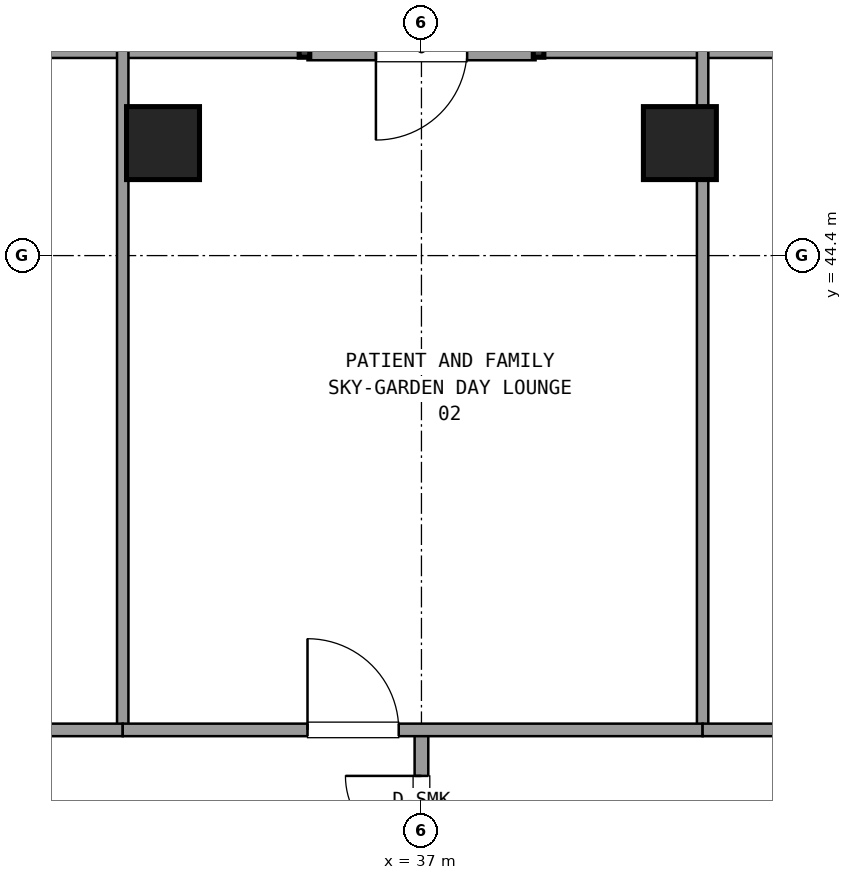
"""IFC4 building model, lengths in metres.
Left out: names, types, materials, properties, quantities, classifications, styles, units other than length and angle.
Written with IfcOpenShell. Run it as: python <this file> out.ifc"""

import sys

from ifc_helpers import new_model, si_unit, direction, frame, frame_2d, origin, origin_2d, place, context, subcontext, project, spatial, rectangle, extrude, element, fill, save


model = new_model("IFC4")
c1 = context("Model", 3, precision=1e-05, world=origin(), true_north=direction((0.0, 1.0)))
c2 = subcontext(c1, "Body", "Model", "MODEL_VIEW")
j1 = project(units=[si_unit("LENGTHUNIT", "METRE"), si_unit("PLANEANGLEUNIT", "RADIAN")], contexts=[c1])
p1 = place(None, origin())
s1 = spatial("IfcSite", under=j1, at=p1, CompositionType="ELEMENT")
p2 = place(p1, origin())
s2 = spatial("IfcBuilding", under=s1, at=p2, CompositionType="ELEMENT")
p3 = place(p2, frame((0.0, 0.0, 160.02)))
s3 = spatial("IfcBuildingStorey", under=s2, at=p3, CompositionType="ELEMENT", Elevation=160.02)
for number, where, z_axis, x_axis in (
    (1, (40.4, 45.88, 0.0), (0.0, 0.0, 1.0), (1.0, 0.0, 0.0)),
    (2, (33.6, 45.88, 0.0), (0.0, 0.0, 1.0), (1.0, 0.0, 0.0)),
):
    element("IfcColumn", number, at=place(p3, frame(where, z_axis=z_axis, x_axis=x_axis)), inside=s3, PredefinedType="COLUMN", context=c2, shape_type="SweptSolid", body=[
        extrude(rectangle(XDim=0.96, YDim=0.96, at=origin_2d()), origin(), (0.0, 0.0, 1.0), 3.6),
    ])
p4 = place(p3, frame((38.501, 47.12, 0.0), z_axis=(0.0, 0.0, 1.0), x_axis=(-1.0, 0.0, 0.0)))
e3 = element("IfcWall", 3, at=p4, inside=s3, PredefinedType="SOLIDWALL", context=c2, shape_type="SweptSolid", body=[
    extrude(rectangle(XDim=3.0, YDim=0.3, at=frame_2d((1.5, 0.0))), origin(), (0.0, 0.0, 1.0), 2.67),
])
p5 = place(p4, frame((0.9, 0.0, 0.0)))
e4 = element("IfcOpeningElement", 4, at=p5, cuts=e3, PredefinedType="OPENING", context=c2, shape_type="SweptSolid", body=[
    extrude(rectangle(XDim=1.2, YDim=2.2, at=frame_2d((0.6, 1.1))), frame((0.0, 0.16, 0.0), z_axis=(0.0, -1.0, 0.0), x_axis=(1.0, 0.0, 0.0)), (0.0, 0.0, 1.0), 0.32),
])
p6 = place(p3, frame((54.329, 47.12, 0.0), z_axis=(0.0, 0.0, 1.0), x_axis=(-1.0, 0.0, 0.0)))
e5 = element("IfcWall", 5, at=p6, inside=s3, PredefinedType="SOLIDWALL", context=c2, shape_type="SweptSolid", body=[
    extrude(rectangle(XDim=15.788, YDim=0.24, at=frame_2d((7.894, 0.0))), origin(), (0.0, 0.0, 1.0), 0.85),
])
p7 = place(p3, frame((35.461, 47.12, 0.0), z_axis=(0.0, 0.0, 1.0), x_axis=(-1.0, 0.0, 0.0)))
e6 = element("IfcWall", 6, at=p7, inside=s3, PredefinedType="SOLIDWALL", context=c2, shape_type="SweptSolid", body=[
    extrude(rectangle(XDim=15.79, YDim=0.24, at=frame_2d((7.895, 0.0))), origin(), (0.0, 0.0, 1.0), 0.85),
])
p8 = place(p3, frame((37.0, 34.95, 0.0), z_axis=(0.0, 0.0, 1.0), x_axis=(0.0, 1.0, 0.0)))
e7 = element("IfcWall", 7, at=p8, inside=s3, PredefinedType="PARTITIONING", context=c2, shape_type="SweptSolid", body=[
    extrude(rectangle(XDim=3.21, YDim=0.18, at=frame_2d((1.605, 0.0))), origin(), (0.0, 0.0, 1.0), 2.61),
])
p9 = place(p8, frame((0.605, 0.0, 0.0)))
e8 = element("IfcOpeningElement", 8, at=p9, cuts=e7, PredefinedType="OPENING", context=c2, shape_type="SweptSolid", body=[
    extrude(rectangle(XDim=2.0, YDim=2.2, at=frame_2d((1.0, 1.1))), frame((0.0, 0.1, 0.0), z_axis=(0.0, -1.0, 0.0), x_axis=(1.0, 0.0, 0.0)), (0.0, 0.0, 1.0), 0.2),
])
p10 = place(p3, frame((33.07, 38.16, 0.0), z_axis=(0.0, 0.0, 1.0), x_axis=(0.0, 1.0, 0.0)))
e9 = element("IfcWall", 9, at=p10, inside=s3, PredefinedType="PARTITIONING", context=c2, shape_type="SweptSolid", body=[
    extrude(rectangle(XDim=8.94, YDim=0.15, at=frame_2d((4.47, 0.0))), origin(), (0.0, 0.0, 1.0), 2.61),
])
p11 = place(p3, frame((25.43, 38.16, 0.0), z_axis=(0.0, 0.0, 1.0), x_axis=(1.0, 0.0, 0.0)))
e10 = element("IfcWall", 10, at=p11, inside=s3, PredefinedType="PARTITIONING", context=c2, shape_type="SweptSolid", body=[
    extrude(rectangle(XDim=7.64, YDim=0.165, at=frame_2d((3.82, 0.0))), origin(), (0.0, 0.0, 1.0), 2.61),
])
p12 = place(p11, frame((3.22, 0.0, 0.0)))
e11 = element("IfcOpeningElement", 11, at=p12, cuts=e10, PredefinedType="OPENING", context=c2, shape_type="SweptSolid", body=[
    extrude(rectangle(XDim=1.2, YDim=2.15, at=frame_2d((0.6, 1.075))), frame((0.0, 0.093, 0.0), z_axis=(0.0, -1.0, 0.0), x_axis=(1.0, 0.0, 0.0)), (0.0, 0.0, 1.0), 0.185),
])
p13 = place(p3, frame((40.699, 38.16, 0.0), z_axis=(0.0, 0.0, 1.0), x_axis=(0.0, 1.0, 0.0)))
e12 = element("IfcWall", 12, at=p13, inside=s3, PredefinedType="PARTITIONING", context=c2, shape_type="SweptSolid", body=[
    extrude(rectangle(XDim=8.94, YDim=0.15, at=frame_2d((4.47, 0.0))), origin(), (0.0, 0.0, 1.0), 2.61),
])
p14 = place(p3, frame((33.07, 38.16, 0.0), z_axis=(0.0, 0.0, 1.0), x_axis=(1.0, 0.0, 0.0)))
e13 = element("IfcWall", 13, at=p14, inside=s3, PredefinedType="PARTITIONING", context=c2, shape_type="SweptSolid", body=[
    extrude(rectangle(XDim=7.629, YDim=0.165, at=frame_2d((3.814, 0.0))), origin(), (0.0, 0.0, 1.0), 2.61),
])
p15 = place(p14, frame((2.431, 0.0, 0.0)))
e14 = element("IfcOpeningElement", 14, at=p15, cuts=e13, PredefinedType="OPENING", context=c2, shape_type="SweptSolid", body=[
    extrude(rectangle(XDim=1.2, YDim=2.15, at=frame_2d((0.6, 1.075))), frame((0.0, 0.093, 0.0), z_axis=(0.0, -1.0, 0.0), x_axis=(1.0, 0.0, 0.0)), (0.0, 0.0, 1.0), 0.185),
])
p16 = place(p3, frame((40.699, 38.16, 0.0), z_axis=(0.0, 0.0, 1.0), x_axis=(1.0, 0.0, 0.0)))
e15 = element("IfcWall", 15, at=p16, inside=s3, PredefinedType="PARTITIONING", context=c2, shape_type="SweptSolid", body=[
    extrude(rectangle(XDim=7.871, YDim=0.165, at=frame_2d((3.936, 0.0))), origin(), (0.0, 0.0, 1.0), 2.61),
])
p17 = place(p16, frame((3.336, 0.0, 0.0)))
e16 = element("IfcOpeningElement", 16, at=p17, cuts=e15, PredefinedType="OPENING", context=c2, shape_type="SweptSolid", body=[
    extrude(rectangle(XDim=1.2, YDim=2.15, at=frame_2d((0.6, 1.075))), frame((0.0, 0.093, 0.0), z_axis=(0.0, -1.0, 0.0), x_axis=(1.0, 0.0, 0.0)), (0.0, 0.0, 1.0), 0.185),
])
p18 = place(p9, origin())
e17 = element("IfcDoor", 17, at=p18, inside=s3, OperationType="DOUBLE_DOOR_SINGLE_SWING", PredefinedType="DOOR", context=c2, shape_type="SweptSolid", body=[
    extrude(rectangle(XDim=2.0, YDim=2.2, at=frame_2d((1.0, 1.1))), frame((0.0, 0.025, 0.0), z_axis=(0.0, -1.0, 0.0), x_axis=(1.0, 0.0, 0.0)), (0.0, 0.0, 1.0), 0.05),
])
fill(e8, e17)
p19 = place(p15, origin())
e18 = element("IfcDoor", 18, at=p19, inside=s3, OperationType="SINGLE_SWING_LEFT", PredefinedType="DOOR", context=c2, shape_type="SweptSolid", body=[
    extrude(rectangle(XDim=1.2, YDim=2.15, at=frame_2d((0.6, 1.075))), frame((0.0, 0.025, 0.0), z_axis=(0.0, -1.0, 0.0), x_axis=(1.0, 0.0, 0.0)), (0.0, 0.0, 1.0), 0.05),
])
fill(e14, e18)
save(model, sys.argv[1])
